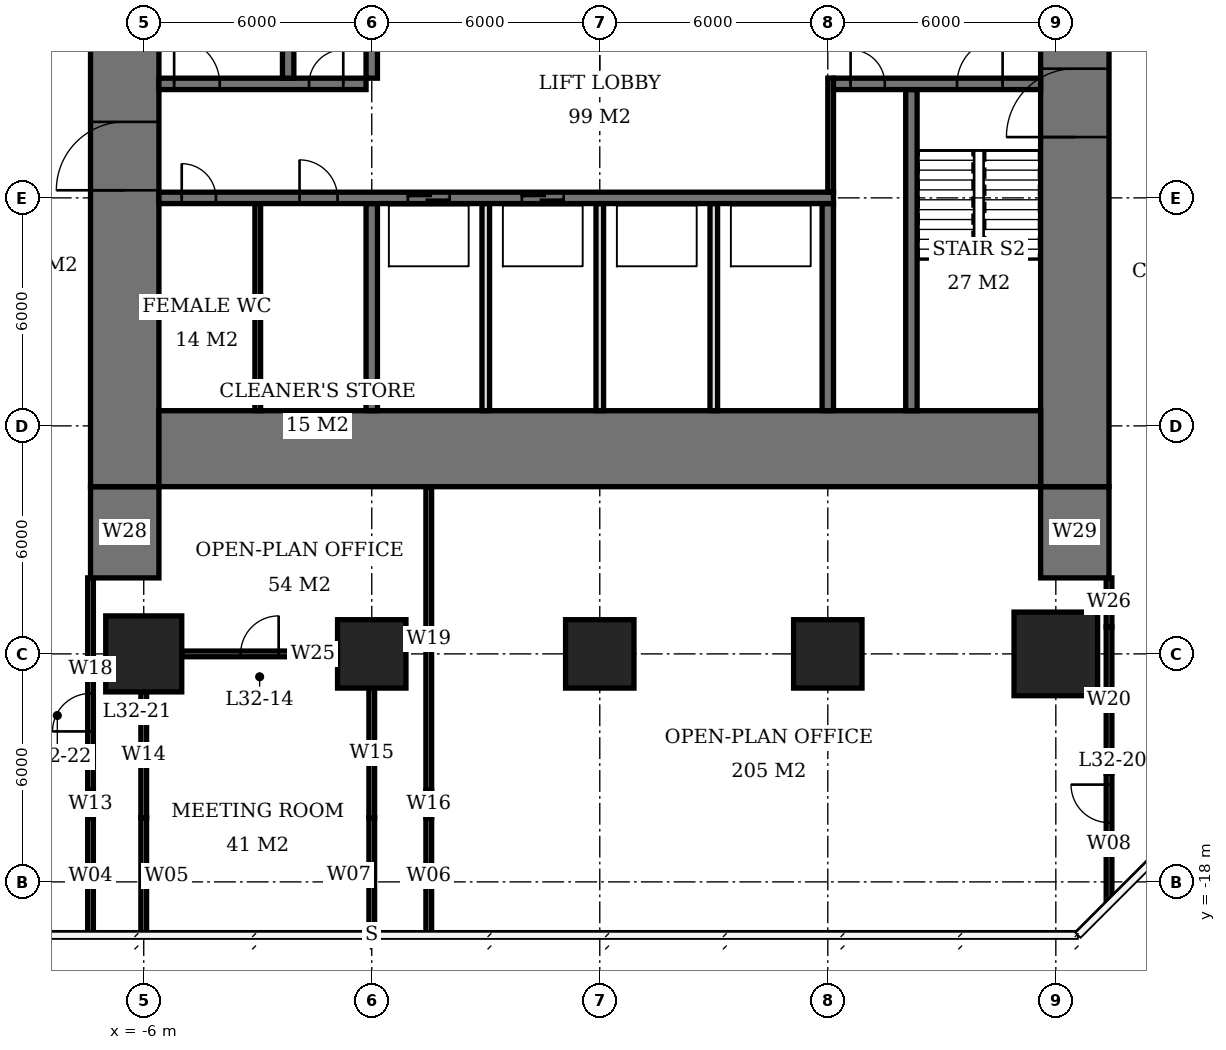
"""IFC4 building model, lengths in metres.
Left out: names, types, materials, properties, quantities, classifications, styles, units other than length and angle.
Written with IfcOpenShell. Run it as: python <this file> out.ifc"""

import sys

from ifc_helpers import new_model, si_unit, direction, frame, frame_2d, origin, origin_2d, place, context, subcontext, project, spatial, rectangle, extrude, element, fill, save


model = new_model("IFC4")
c1 = context("Model", 3, precision=1e-05, world=origin(), true_north=direction((0.0, 1.0)))
c2 = subcontext(c1, "Body", "Model", "MODEL_VIEW")
j1 = project(units=[si_unit("LENGTHUNIT", "METRE"), si_unit("PLANEANGLEUNIT", "RADIAN")], contexts=[c1])
p1 = place(None, origin())
s1 = spatial("IfcSite", under=j1, at=p1, CompositionType="ELEMENT")
p2 = place(p1, origin())
s2 = spatial("IfcBuilding", under=s1, at=p2, CompositionType="ELEMENT")
p3 = place(p2, frame((0.0, 0.0, 132.8)))
s3 = spatial("IfcBuildingStorey", under=s2, at=p3, CompositionType="ELEMENT", Elevation=132.8)
p4 = place(p3, frame((-6.0, -12.0, 0.0), z_axis=(0.0, 0.0, 1.0), x_axis=(1.0, 0.0, 0.0)))
e1 = element("IfcColumn", 1, at=p4, inside=s3, PredefinedType="COLUMN", context=c2, shape_type="SweptSolid", body=[
    extrude(rectangle(XDim=2.0, YDim=2.0, at=origin_2d()), origin(), (0.0, 0.0, 1.0), 3.9),
])
for number, where, z_axis, x_axis in (
    (2, (0.0, -12.0, 0.0), (0.0, 0.0, 1.0), (1.0, 0.0, 0.0)),
    (3, (6.0, -12.0, 0.0), (0.0, 0.0, 1.0), (1.0, 0.0, 0.0)),
    (4, (12.0, -12.0, 0.0), (0.0, 0.0, 1.0), (1.0, 0.0, 0.0)),
):
    element("IfcColumn", number, at=place(p3, frame(where, z_axis=z_axis, x_axis=x_axis)), inside=s3, PredefinedType="COLUMN", context=c2, shape_type="SweptSolid", body=[
        extrude(rectangle(XDim=1.8, YDim=1.8, at=origin_2d()), origin(), (0.0, 0.0, 1.0), 3.9),
    ])
p5 = place(p3, frame((18.0, -12.0, 0.0), z_axis=(0.0, 0.0, 1.0), x_axis=(1.0, 0.0, 0.0)))
e5 = element("IfcColumn", 5, at=p5, inside=s3, PredefinedType="COLUMN", context=c2, shape_type="SweptSolid", body=[
    extrude(rectangle(XDim=2.2, YDim=2.2, at=origin_2d()), origin(), (0.0, 0.0, 1.0), 3.9),
])
p6 = place(p3, frame((-5.6, -6.6, 0.0), z_axis=(0.0, 0.0, 1.0), x_axis=(1.0, 0.0, 0.0)))
e6 = element("IfcWall", 6, at=p6, inside=s3, PredefinedType="SHEAR", context=c2, shape_type="SweptSolid", body=[
    extrude(rectangle(XDim=23.2, YDim=2.0, at=frame_2d((11.6, 0.0))), origin(), (0.0, 0.0, 1.0), 3.9),
])
p7 = place(p3, frame((-6.5, -7.6, 0.0), z_axis=(0.0, 0.0, 1.0), x_axis=(0.0, 1.0, 0.0)))
e7 = element("IfcWall", 7, at=p7, inside=s3, PredefinedType="SHEAR", context=c2, shape_type="SweptSolid", body=[
    extrude(rectangle(XDim=21.2, YDim=1.8, at=frame_2d((10.6, 0.0))), origin(), (0.0, 0.0, 1.0), 3.9),
])
p8 = place(p7, frame((7.8, 0.0, 0.0)))
e8 = element("IfcOpeningElement", 8, at=p8, cuts=e7, PredefinedType="OPENING", context=c2, shape_type="SweptSolid", body=[
    extrude(rectangle(XDim=1.8, YDim=2.4, at=frame_2d((0.9, 1.2))), frame((0.0, 0.91, 0.0), z_axis=(0.0, -1.0, 0.0), x_axis=(1.0, 0.0, 0.0)), (0.0, 0.0, 1.0), 1.82),
])
p9 = place(p3, frame((18.5, -7.6, 0.0), z_axis=(0.0, 0.0, 1.0), x_axis=(0.0, 1.0, 0.0)))
e9 = element("IfcWall", 9, at=p9, inside=s3, PredefinedType="SHEAR", context=c2, shape_type="SweptSolid", body=[
    extrude(rectangle(XDim=21.2, YDim=1.8, at=frame_2d((10.6, 0.0))), origin(), (0.0, 0.0, 1.0), 3.9),
])
p10 = place(p9, frame((9.2, 0.0, 0.0)))
e10 = element("IfcOpeningElement", 10, at=p10, cuts=e9, PredefinedType="OPENING", context=c2, shape_type="SweptSolid", body=[
    extrude(rectangle(XDim=1.8, YDim=2.4, at=frame_2d((0.9, 1.2))), frame((0.0, 0.91, 0.0), z_axis=(0.0, -1.0, 0.0), x_axis=(1.0, 0.0, 0.0)), (0.0, 0.0, 1.0), 1.82),
])
for number, where, z_axis, x_axis in (
    (11, (-6.5, -10.0, 0.0), (0.0, 0.0, 1.0), (0.0, 1.0, 0.0)),
    (12, (18.5, -10.0, 0.0), (0.0, 0.0, 1.0), (0.0, 1.0, 0.0)),
):
    element("IfcWall", number, at=place(p3, frame(where, z_axis=z_axis, x_axis=x_axis)), inside=s3, PredefinedType="SHEAR", context=c2, shape_type="SweptSolid", body=[
        extrude(rectangle(XDim=2.4, YDim=1.8, at=frame_2d((1.2, 0.0))), origin(), (0.0, 0.0, 1.0), 3.9),
    ])
p11 = place(p3, frame((-5.6, 0.0, 0.0), z_axis=(0.0, 0.0, 1.0), x_axis=(1.0, 0.0, 0.0)))
e13 = element("IfcWall", 13, at=p11, inside=s3, PredefinedType="SHEAR", context=c2, shape_type="SweptSolid", body=[
    extrude(rectangle(XDim=17.75, YDim=0.3, at=frame_2d((8.875, 0.0))), origin(), (0.0, 0.0, 1.0), 3.9),
])
p12 = place(p11, frame((0.6, 0.0, 0.0)))
e14 = element("IfcOpeningElement", 14, at=p12, cuts=e13, PredefinedType="OPENING", context=c2, shape_type="SweptSolid", body=[
    extrude(rectangle(XDim=0.9, YDim=2.1, at=frame_2d((0.45, 1.05))), frame((0.0, 0.16, 0.0), z_axis=(0.0, -1.0, 0.0), x_axis=(1.0, 0.0, 0.0)), (0.0, 0.0, 1.0), 0.32),
])
p13 = place(p11, frame((3.7, 0.0, 0.0)))
e15 = element("IfcOpeningElement", 15, at=p13, cuts=e13, PredefinedType="OPENING", context=c2, shape_type="SweptSolid", body=[
    extrude(rectangle(XDim=1.0, YDim=2.1, at=frame_2d((0.5, 1.05))), frame((0.0, 0.16, 0.0), z_axis=(0.0, -1.0, 0.0), x_axis=(1.0, 0.0, 0.0)), (0.0, 0.0, 1.0), 0.32),
])
p14 = place(p11, frame((6.55, 0.0, 0.0)))
e16 = element("IfcOpeningElement", 16, at=p14, cuts=e13, PredefinedType="OPENING", context=c2, shape_type="SweptSolid", body=[
    extrude(rectangle(XDim=1.1, YDim=2.1, at=frame_2d((0.55, 1.05))), frame((0.0, 0.16, 0.0), z_axis=(0.0, -1.0, 0.0), x_axis=(1.0, 0.0, 0.0)), (0.0, 0.0, 1.0), 0.32),
])
p15 = place(p11, frame((9.55, 0.0, 0.0)))
e17 = element("IfcOpeningElement", 17, at=p15, cuts=e13, PredefinedType="OPENING", context=c2, shape_type="SweptSolid", body=[
    extrude(rectangle(XDim=1.1, YDim=2.1, at=frame_2d((0.55, 1.05))), frame((0.0, 0.16, 0.0), z_axis=(0.0, -1.0, 0.0), x_axis=(1.0, 0.0, 0.0)), (0.0, 0.0, 1.0), 0.32),
])
p16 = place(p3, frame((-5.6, 3.0, 0.0), z_axis=(0.0, 0.0, 1.0), x_axis=(1.0, 0.0, 0.0)))
e18 = element("IfcWall", 18, at=p16, inside=s3, PredefinedType="SHEAR", context=c2, shape_type="SweptSolid", body=[
    extrude(rectangle(XDim=5.45, YDim=0.3, at=frame_2d((2.725, 0.0))), origin(), (0.0, 0.0, 1.0), 3.9),
])
p17 = place(p16, frame((0.4, 0.0, 0.0)))
e19 = element("IfcOpeningElement", 19, at=p17, cuts=e18, PredefinedType="OPENING", context=c2, shape_type="SweptSolid", body=[
    extrude(rectangle(XDim=1.2, YDim=2.1, at=frame_2d((0.6, 1.05))), frame((0.0, 0.16, 0.0), z_axis=(0.0, -1.0, 0.0), x_axis=(1.0, 0.0, 0.0)), (0.0, 0.0, 1.0), 0.32),
])
p18 = place(p16, frame((3.95, 0.0, 0.0)))
e20 = element("IfcOpeningElement", 20, at=p18, cuts=e18, PredefinedType="OPENING", context=c2, shape_type="SweptSolid", body=[
    extrude(rectangle(XDim=0.9, YDim=2.1, at=frame_2d((0.45, 1.05))), frame((0.0, 0.16, 0.0), z_axis=(0.0, -1.0, 0.0), x_axis=(1.0, 0.0, 0.0)), (0.0, 0.0, 1.0), 0.32),
])
p19 = place(p3, frame((12.15, 3.0, 0.0), z_axis=(0.0, 0.0, 1.0), x_axis=(1.0, 0.0, 0.0)))
e21 = element("IfcWall", 21, at=p19, inside=s3, PredefinedType="SHEAR", context=c2, shape_type="SweptSolid", body=[
    extrude(rectangle(XDim=5.45, YDim=0.3, at=frame_2d((2.725, 0.0))), origin(), (0.0, 0.0, 1.0), 3.9),
])
p20 = place(p19, frame((3.25, 0.0, 0.0)))
e22 = element("IfcOpeningElement", 22, at=p20, cuts=e21, PredefinedType="OPENING", context=c2, shape_type="SweptSolid", body=[
    extrude(rectangle(XDim=1.2, YDim=2.1, at=frame_2d((0.6, 1.05))), frame((0.0, 0.16, 0.0), z_axis=(0.0, -1.0, 0.0), x_axis=(1.0, 0.0, 0.0)), (0.0, 0.0, 1.0), 0.32),
])
p21 = place(p19, frame((0.45, 0.0, 0.0)))
e23 = element("IfcOpeningElement", 23, at=p21, cuts=e21, PredefinedType="OPENING", context=c2, shape_type="SweptSolid", body=[
    extrude(rectangle(XDim=0.9, YDim=2.1, at=frame_2d((0.45, 1.05))), frame((0.0, 0.16, 0.0), z_axis=(0.0, -1.0, 0.0), x_axis=(1.0, 0.0, 0.0)), (0.0, 0.0, 1.0), 0.32),
])
p22 = place(p3, frame((0.0, -5.6, 0.0), z_axis=(0.0, 0.0, 1.0), x_axis=(0.0, 1.0, 0.0)))
e24 = element("IfcWall", 24, at=p22, inside=s3, PredefinedType="SHEAR", context=c2, shape_type="SweptSolid", body=[
    extrude(rectangle(XDim=5.45, YDim=0.3, at=frame_2d((2.725, 0.0))), origin(), (0.0, 0.0, 1.0), 3.9),
])
p23 = place(p3, frame((0.0, 3.15, 0.0), z_axis=(0.0, 0.0, 1.0), x_axis=(0.0, 1.0, 0.0)))
e25 = element("IfcWall", 25, at=p23, inside=s3, PredefinedType="SHEAR", context=c2, shape_type="SweptSolid", body=[
    extrude(rectangle(XDim=8.45, YDim=0.3, at=frame_2d((4.225, 0.0))), origin(), (0.0, 0.0, 1.0), 3.9),
])
p24 = place(p3, frame((12.0, -5.6, 0.0), z_axis=(0.0, 0.0, 1.0), x_axis=(0.0, 1.0, 0.0)))
e26 = element("IfcWall", 26, at=p24, inside=s3, PredefinedType="SHEAR", context=c2, shape_type="SweptSolid", body=[
    extrude(rectangle(XDim=5.45, YDim=0.3, at=frame_2d((2.725, 0.0))), origin(), (0.0, 0.0, 1.0), 3.9),
])
for number, where, z_axis, x_axis in (
    (27, (-2.2, 3.15, 0.0), (0.0, 0.0, 1.0), (0.0, 1.0, 0.0)),
    (28, (14.2, -5.6, 0.0), (0.0, 0.0, 1.0), (0.0, 1.0, 0.0)),
):
    element("IfcWall", number, at=place(p3, frame(where, z_axis=z_axis, x_axis=x_axis)), inside=s3, PredefinedType="SHEAR", context=c2, shape_type="SweptSolid", body=[
        extrude(rectangle(XDim=8.45, YDim=0.3, at=frame_2d((4.225, 0.0))), origin(), (0.0, 0.0, 1.0), 3.9),
    ])
for number, where, z_axis, x_axis in (
    (29, (3.0, -5.6, 0.0), (0.0, 0.0, 1.0), (0.0, 1.0, 0.0)),
    (30, (6.0, -5.6, 0.0), (0.0, 0.0, 1.0), (0.0, 1.0, 0.0)),
    (31, (9.0, -5.6, 0.0), (0.0, 0.0, 1.0), (0.0, 1.0, 0.0)),
):
    element("IfcWall", number, at=place(p3, frame(where, z_axis=z_axis, x_axis=x_axis)), inside=s3, PredefinedType="SOLIDWALL", context=c2, shape_type="SweptSolid", body=[
        extrude(rectangle(XDim=5.45, YDim=0.2, at=frame_2d((2.725, 0.0))), origin(), (0.0, 0.0, 1.0), 3.9),
    ])
p25 = place(p3, frame((-3.0, -5.6, 0.0), z_axis=(0.0, 0.0, 1.0), x_axis=(0.0, 1.0, 0.0)))
e32 = element("IfcWall", 32, at=p25, inside=s3, PredefinedType="PLUMBINGWALL", context=c2, shape_type="SweptSolid", body=[
    extrude(rectangle(XDim=5.45, YDim=0.15, at=frame_2d((2.725, 0.0))), origin(), (0.0, 0.0, 1.0), 3.65),
])
p26 = place(p3, frame((-5.0, -12.0, 0.0), z_axis=(0.0, 0.0, 1.0), x_axis=(1.0, 0.0, 0.0)))
e33 = element("IfcWall", 33, at=p26, inside=s3, PredefinedType="PARTITIONING", context=c2, shape_type="SweptSolid", body=[
    extrude(rectangle(XDim=4.1, YDim=0.15, at=frame_2d((2.05, 0.0))), origin(), (0.0, 0.0, 1.0), 3.65),
])
p27 = place(p26, frame((1.55, 0.0, 0.0)))
e34 = element("IfcOpeningElement", 34, at=p27, cuts=e33, PredefinedType="OPENING", context=c2, shape_type="SweptSolid", body=[
    extrude(rectangle(XDim=1.0, YDim=2.1, at=frame_2d((0.5, 1.05))), frame((0.0, 0.085, 0.0), z_axis=(0.0, -1.0, 0.0), x_axis=(1.0, 0.0, 0.0)), (0.0, 0.0, 1.0), 0.17),
])
p28 = place(p3, frame((-6.0, -19.4, 0.0), z_axis=(0.0, 0.0, 1.0), x_axis=(0.0, 1.0, 0.0)))
e35 = element("IfcWall", 35, at=p28, inside=s3, PredefinedType="PARTITIONING", context=c2, shape_type="SweptSolid", body=[
    extrude(rectangle(XDim=3.09, YDim=0.15, at=frame_2d((1.545, 0.0))), origin(), (0.0, 0.0, 1.0), 3.65),
])
p29 = place(p3, frame((-6.0, -16.31, 0.0), z_axis=(0.0, 0.0, 1.0), x_axis=(0.0, 1.0, 0.0)))
e36 = element("IfcWall", 36, at=p29, inside=s3, PredefinedType="PARTITIONING", context=c2, shape_type="SweptSolid", body=[
    extrude(rectangle(XDim=3.31, YDim=0.15, at=frame_2d((1.655, 0.0))), origin(), (0.0, 0.0, 1.0), 2.65),
])
p30 = place(p3, frame((0.0, -19.35, 0.0), z_axis=(0.0, 0.0, 1.0), x_axis=(0.0, 1.0, 0.0)))
e37 = element("IfcWall", 37, at=p30, inside=s3, PredefinedType="PARTITIONING", context=c2, shape_type="SweptSolid", body=[
    extrude(rectangle(XDim=3.04, YDim=0.15, at=frame_2d((1.52, 0.0))), origin(), (0.0, 0.0, 1.0), 3.65),
])
p31 = place(p3, frame((0.0, -16.31, 0.0), z_axis=(0.0, 0.0, 1.0), x_axis=(0.0, 1.0, 0.0)))
e38 = element("IfcWall", 38, at=p31, inside=s3, PredefinedType="PARTITIONING", context=c2, shape_type="SweptSolid", body=[
    extrude(rectangle(XDim=3.41, YDim=0.15, at=frame_2d((1.705, 0.0))), origin(), (0.0, 0.0, 1.0), 2.65),
])
p32 = place(p3, frame((-7.4, -19.4, 0.0), z_axis=(0.0, 0.0, 1.0), x_axis=(0.0, 1.0, 0.0)))
e39 = element("IfcWall", 39, at=p32, inside=s3, PredefinedType="PARTITIONING", context=c2, shape_type="SweptSolid", body=[
    extrude(rectangle(XDim=3.09, YDim=0.15, at=frame_2d((1.545, 0.0))), origin(), (0.0, 0.0, 1.0), 3.65),
])
p33 = place(p3, frame((-7.4, -16.31, 0.0), z_axis=(0.0, 0.0, 1.0), x_axis=(0.0, 1.0, 0.0)))
e40 = element("IfcWall", 40, at=p33, inside=s3, PredefinedType="PARTITIONING", context=c2, shape_type="SweptSolid", body=[
    extrude(rectangle(XDim=0.72, YDim=0.15, at=frame_2d((0.36, 0.0))), origin(), (0.0, 0.0, 1.0), 2.65),
])
p34 = place(p3, frame((-7.4, -15.59, 0.0), z_axis=(0.0, 0.0, 1.0), x_axis=(0.0, 1.0, 0.0)))
e41 = element("IfcWall", 41, at=p34, inside=s3, PredefinedType="PARTITIONING", context=c2, shape_type="SweptSolid", body=[
    extrude(rectangle(XDim=5.59, YDim=0.15, at=frame_2d((2.795, 0.0))), origin(), (0.0, 0.0, 1.0), 3.65),
])
p35 = place(p34, frame((1.55, 0.0, 0.0)))
e42 = element("IfcOpeningElement", 42, at=p35, cuts=e41, PredefinedType="OPENING", context=c2, shape_type="SweptSolid", body=[
    extrude(rectangle(XDim=1.0, YDim=2.1, at=frame_2d((0.5, 1.05))), frame((0.0, 0.085, 0.0), z_axis=(0.0, -1.0, 0.0), x_axis=(1.0, 0.0, 0.0)), (0.0, 0.0, 1.0), 0.17),
])
p36 = place(p3, frame((1.5, -19.4, 0.0), z_axis=(0.0, 0.0, 1.0), x_axis=(0.0, 1.0, 0.0)))
e43 = element("IfcWall", 43, at=p36, inside=s3, PredefinedType="PARTITIONING", context=c2, shape_type="SweptSolid", body=[
    extrude(rectangle(XDim=3.09, YDim=0.15, at=frame_2d((1.545, 0.0))), origin(), (0.0, 0.0, 1.0), 3.65),
])
p37 = place(p3, frame((1.5, -16.31, 0.0), z_axis=(0.0, 0.0, 1.0), x_axis=(0.0, 1.0, 0.0)))
e44 = element("IfcWall", 44, at=p37, inside=s3, PredefinedType="PARTITIONING", context=c2, shape_type="SweptSolid", body=[
    extrude(rectangle(XDim=0.72, YDim=0.15, at=frame_2d((0.36, 0.0))), origin(), (0.0, 0.0, 1.0), 2.65),
])
p38 = place(p3, frame((1.5, -15.59, 0.0), z_axis=(0.0, 0.0, 1.0), x_axis=(0.0, 1.0, 0.0)))
e45 = element("IfcWall", 45, at=p38, inside=s3, PredefinedType="PARTITIONING", context=c2, shape_type="SweptSolid", body=[
    extrude(rectangle(XDim=7.99, YDim=0.15, at=frame_2d((3.995, 0.0))), origin(), (0.0, 0.0, 1.0), 3.65),
])
p39 = place(p3, frame((19.4, -18.489, 0.0), z_axis=(0.0, 0.0, 1.0), x_axis=(0.0, 1.0, 0.0)))
e46 = element("IfcWall", 46, at=p39, inside=s3, PredefinedType="PARTITIONING", context=c2, shape_type="SweptSolid", body=[
    extrude(rectangle(XDim=3.349, YDim=0.15, at=frame_2d((1.675, 0.0))), origin(), (0.0, 0.0, 1.0), 3.65),
])
p40 = place(p39, frame((2.049, 0.0, 0.0)))
e47 = element("IfcOpeningElement", 47, at=p40, cuts=e46, PredefinedType="OPENING", context=c2, shape_type="SweptSolid", body=[
    extrude(rectangle(XDim=1.0, YDim=2.1, at=frame_2d((0.5, 1.05))), frame((0.0, 0.085, 0.0), z_axis=(0.0, -1.0, 0.0), x_axis=(1.0, 0.0, 0.0)), (0.0, 0.0, 1.0), 0.17),
])
p41 = place(p3, frame((19.4, -15.14, 0.0), z_axis=(0.0, 0.0, 1.0), x_axis=(0.0, 1.0, 0.0)))
e48 = element("IfcWall", 48, at=p41, inside=s3, PredefinedType="PARTITIONING", context=c2, shape_type="SweptSolid", body=[
    extrude(rectangle(XDim=3.85, YDim=0.15, at=frame_2d((1.925, 0.0))), origin(), (0.0, 0.0, 1.0), 2.65),
])
p42 = place(p3, frame((19.4, -11.29, 0.0), z_axis=(0.0, 0.0, 1.0), x_axis=(0.0, 1.0, 0.0)))
e49 = element("IfcWall", 49, at=p42, inside=s3, PredefinedType="PARTITIONING", context=c2, shape_type="SweptSolid", body=[
    extrude(rectangle(XDim=1.29, YDim=0.15, at=frame_2d((0.645, 0.0))), origin(), (0.0, 0.0, 1.0), 3.65),
])
p43 = place(p3, frame((12.075, 0.15, 0.0), z_axis=(0.0, 0.0, 1.0), x_axis=(0.0, 1.0, 0.0)))
e50 = element("IfcWall", 50, at=p43, inside=s3, PredefinedType="PARTITIONING", context=c2, shape_type="SweptSolid", body=[
    extrude(rectangle(XDim=3.0, YDim=0.15, at=frame_2d((1.5, 0.0))), origin(), (0.0, 0.0, 1.0), 3.65),
])
p44 = place(p8, origin())
e51 = element("IfcDoor", 51, at=p44, inside=s3, OperationType="DOUBLE_DOOR_SINGLE_SWING", PredefinedType="DOOR", context=c2, shape_type="SweptSolid", body=[
    extrude(rectangle(XDim=1.8, YDim=2.4, at=frame_2d((0.9, 1.2))), frame((0.0, 0.025, 0.0), z_axis=(0.0, -1.0, 0.0), x_axis=(1.0, 0.0, 0.0)), (0.0, 0.0, 1.0), 0.05),
])
fill(e8, e51)
p45 = place(p10, origin())
e52 = element("IfcDoor", 52, at=p45, inside=s3, OperationType="DOUBLE_DOOR_SINGLE_SWING", PredefinedType="DOOR", context=c2, shape_type="SweptSolid", body=[
    extrude(rectangle(XDim=1.8, YDim=2.4, at=frame_2d((0.9, 1.2))), frame((0.0, 0.025, 0.0), z_axis=(0.0, -1.0, 0.0), x_axis=(1.0, 0.0, 0.0)), (0.0, 0.0, 1.0), 0.05),
])
fill(e10, e52)
p46 = place(p17, origin())
e53 = element("IfcDoor", 53, at=p46, inside=s3, OperationType="SINGLE_SWING_LEFT", PredefinedType="DOOR", context=c2, shape_type="SweptSolid", body=[
    extrude(rectangle(XDim=1.2, YDim=2.1, at=frame_2d((0.6, 1.05))), frame((0.0, 0.025, 0.0), z_axis=(0.0, -1.0, 0.0), x_axis=(1.0, 0.0, 0.0)), (0.0, 0.0, 1.0), 0.05),
])
fill(e19, e53)
p47 = place(p18, origin())
e54 = element("IfcDoor", 54, at=p47, inside=s3, OperationType="SINGLE_SWING_RIGHT", PredefinedType="DOOR", context=c2, shape_type="SweptSolid", body=[
    extrude(rectangle(XDim=0.9, YDim=2.1, at=frame_2d((0.45, 1.05))), frame((0.0, 0.025, 0.0), z_axis=(0.0, -1.0, 0.0), x_axis=(1.0, 0.0, 0.0)), (0.0, 0.0, 1.0), 0.05),
])
fill(e20, e54)
p48 = place(p20, origin())
e55 = element("IfcDoor", 55, at=p48, inside=s3, OperationType="SINGLE_SWING_RIGHT", PredefinedType="DOOR", context=c2, shape_type="SweptSolid", body=[
    extrude(rectangle(XDim=1.2, YDim=2.1, at=frame_2d((0.6, 1.05))), frame((0.0, 0.025, 0.0), z_axis=(0.0, -1.0, 0.0), x_axis=(1.0, 0.0, 0.0)), (0.0, 0.0, 1.0), 0.05),
])
fill(e22, e55)
p49 = place(p21, origin())
e56 = element("IfcDoor", 56, at=p49, inside=s3, OperationType="SINGLE_SWING_LEFT", PredefinedType="DOOR", context=c2, shape_type="SweptSolid", body=[
    extrude(rectangle(XDim=0.9, YDim=2.1, at=frame_2d((0.45, 1.05))), frame((0.0, 0.025, 0.0), z_axis=(0.0, -1.0, 0.0), x_axis=(1.0, 0.0, 0.0)), (0.0, 0.0, 1.0), 0.05),
])
fill(e23, e56)
p50 = place(p12, origin())
e57 = element("IfcDoor", 57, at=p50, inside=s3, OperationType="SINGLE_SWING_LEFT", PredefinedType="DOOR", context=c2, shape_type="SweptSolid", body=[
    extrude(rectangle(XDim=0.9, YDim=2.1, at=frame_2d((0.45, 1.05))), frame((0.0, 0.025, 0.0), z_axis=(0.0, -1.0, 0.0), x_axis=(1.0, 0.0, 0.0)), (0.0, 0.0, 1.0), 0.05),
])
fill(e14, e57)
p51 = place(p13, origin())
e58 = element("IfcDoor", 58, at=p51, inside=s3, OperationType="SINGLE_SWING_LEFT", PredefinedType="DOOR", context=c2, shape_type="SweptSolid", body=[
    extrude(rectangle(XDim=1.0, YDim=2.1, at=frame_2d((0.5, 1.05))), frame((0.0, 0.025, 0.0), z_axis=(0.0, -1.0, 0.0), x_axis=(1.0, 0.0, 0.0)), (0.0, 0.0, 1.0), 0.05),
])
fill(e15, e58)
p52 = place(p14, origin())
e59 = element("IfcDoor", 59, at=p52, inside=s3, OperationType="DOUBLE_DOOR_SLIDING", PredefinedType="USERDEFINED", context=c2, shape_type="SweptSolid", body=[
    extrude(rectangle(XDim=1.1, YDim=2.1, at=frame_2d((0.55, 1.05))), frame((0.0, 0.025, 0.0), z_axis=(0.0, -1.0, 0.0), x_axis=(1.0, 0.0, 0.0)), (0.0, 0.0, 1.0), 0.05),
])
fill(e16, e59)
p53 = place(p15, origin())
e60 = element("IfcDoor", 60, at=p53, inside=s3, OperationType="DOUBLE_DOOR_SLIDING", PredefinedType="USERDEFINED", context=c2, shape_type="SweptSolid", body=[
    extrude(rectangle(XDim=1.1, YDim=2.1, at=frame_2d((0.55, 1.05))), frame((0.0, 0.025, 0.0), z_axis=(0.0, -1.0, 0.0), x_axis=(1.0, 0.0, 0.0)), (0.0, 0.0, 1.0), 0.05),
])
fill(e17, e60)
p54 = place(p27, origin())
e61 = element("IfcDoor", 61, at=p54, inside=s3, OperationType="SINGLE_SWING_RIGHT", PredefinedType="DOOR", context=c2, shape_type="SweptSolid", body=[
    extrude(rectangle(XDim=1.0, YDim=2.1, at=frame_2d((0.5, 1.05))), frame((0.0, 0.025, 0.0), z_axis=(0.0, -1.0, 0.0), x_axis=(1.0, 0.0, 0.0)), (0.0, 0.0, 1.0), 0.05),
])
fill(e34, e61)
p55 = place(p40, origin())
e62 = element("IfcDoor", 62, at=p55, inside=s3, OperationType="SINGLE_SWING_RIGHT", PredefinedType="DOOR", context=c2, shape_type="SweptSolid", body=[
    extrude(rectangle(XDim=1.0, YDim=2.1, at=frame_2d((0.5, 1.05))), frame((0.0, 0.025, 0.0), z_axis=(0.0, -1.0, 0.0), x_axis=(1.0, 0.0, 0.0)), (0.0, 0.0, 1.0), 0.05),
])
fill(e47, e62)
p56 = place(p35, origin())
e63 = element("IfcDoor", 63, at=p56, inside=s3, OperationType="SINGLE_SWING_LEFT", PredefinedType="DOOR", context=c2, shape_type="SweptSolid", body=[
    extrude(rectangle(XDim=1.0, YDim=2.1, at=frame_2d((0.5, 1.05))), frame((0.0, 0.025, 0.0), z_axis=(0.0, -1.0, 0.0), x_axis=(1.0, 0.0, 0.0)), (0.0, 0.0, 1.0), 0.05),
])
fill(e42, e63)
save(model, sys.argv[1])
